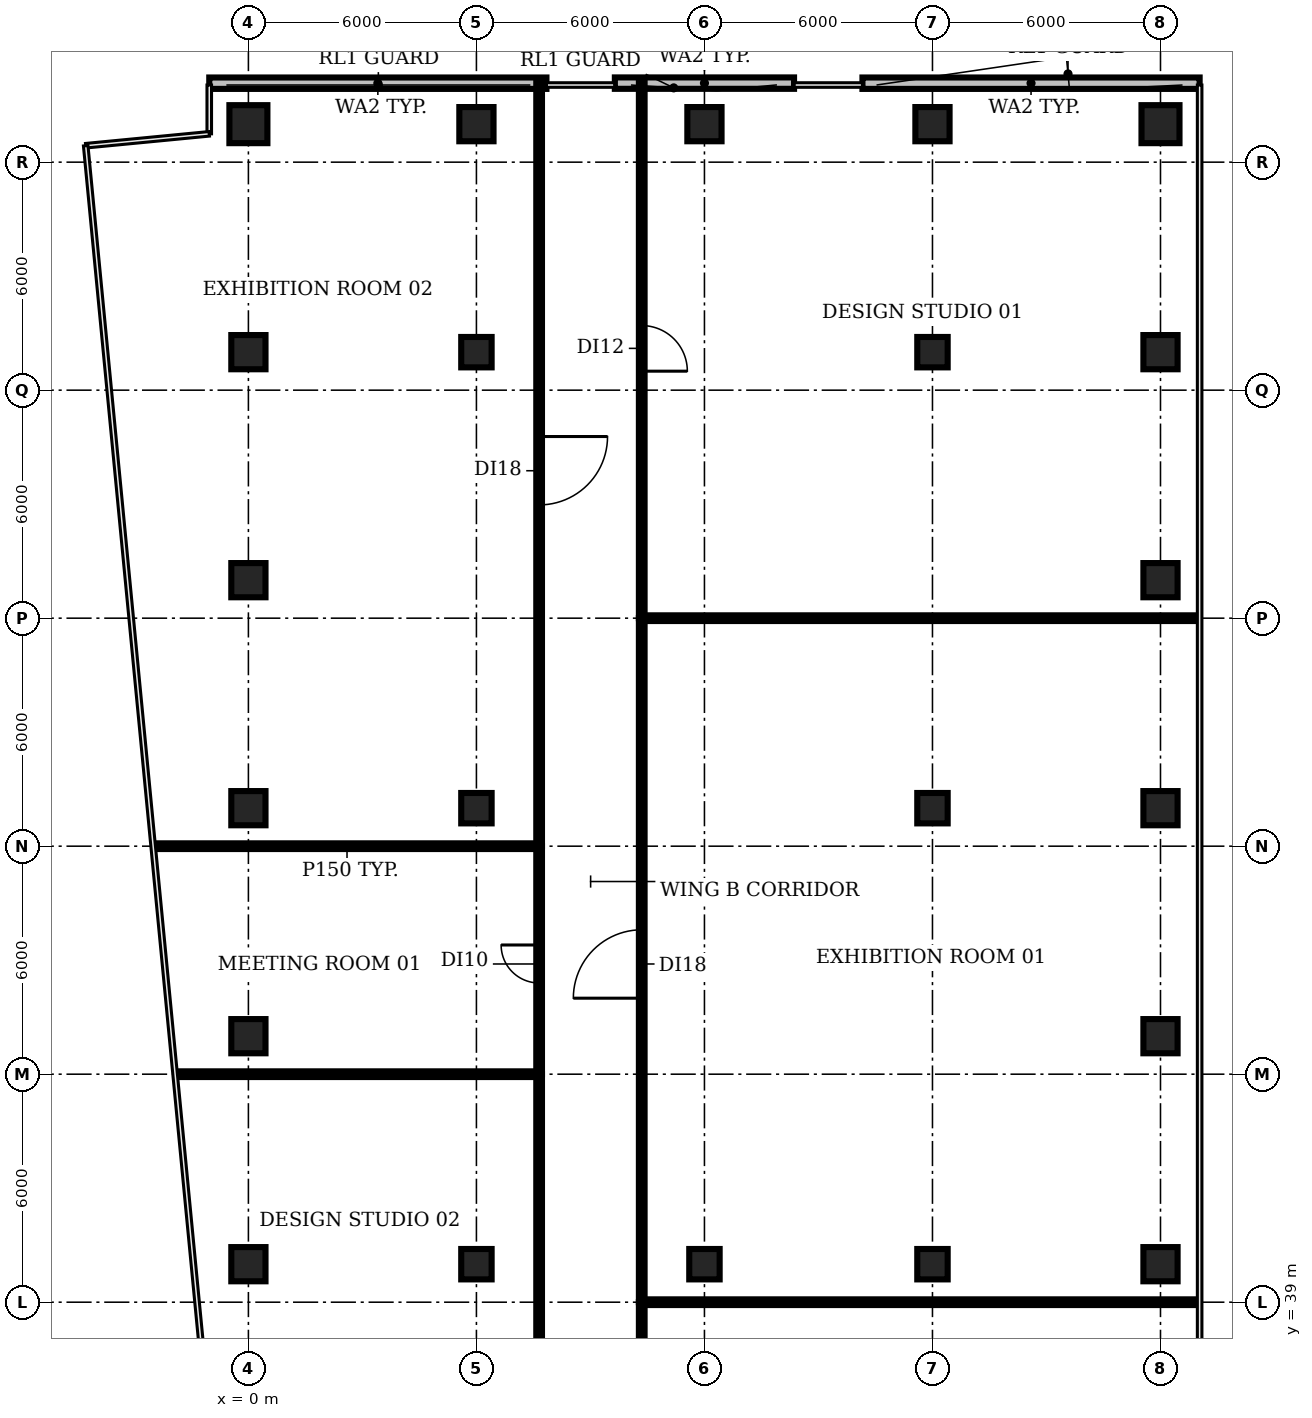
"""IFC4 building model, lengths in metres.
Left out: names, types, materials, properties, quantities, classifications, styles, units other than length and angle.
Written with IfcOpenShell. Run it as: python <this file> out.ifc"""

import sys

from ifc_helpers import new_model, si_unit, direction, frame, frame_2d, origin, origin_2d, place, context, subcontext, project, spatial, rectangle, circle, extrude, element, fill, save


model = new_model("IFC4")
c1 = context("Model", 3, precision=1e-05, world=origin(), true_north=direction((0.0, 1.0)))
c2 = subcontext(c1, "Body", "Model", "MODEL_VIEW")
j1 = project(units=[si_unit("LENGTHUNIT", "METRE"), si_unit("PLANEANGLEUNIT", "RADIAN")], contexts=[c1])
p1 = place(None, origin())
s1 = spatial("IfcSite", under=j1, at=p1, CompositionType="ELEMENT")
p2 = place(p1, origin())
s2 = spatial("IfcBuilding", under=s1, at=p2, CompositionType="ELEMENT")
p3 = place(p2, frame((0.0, 0.0, 205.4)))
s3 = spatial("IfcBuildingStorey", under=s2, at=p3, CompositionType="ELEMENT", Elevation=205.4)
for number, where, z_axis, x_axis in (
    (1, (0.0, 40.0, -0.35), (0.0, 0.0, 1.0), (1.0, 0.0, 0.0)),
    (2, (0.0, 46.0, -0.35), (0.0, 0.0, 1.0), (1.0, 0.0, 0.0)),
    (3, (0.0, 52.0, -0.35), (0.0, 0.0, 1.0), (1.0, 0.0, 0.0)),
    (4, (0.0, 58.0, -0.35), (0.0, 0.0, 1.0), (1.0, 0.0, 0.0)),
    (5, (0.0, 64.0, -0.35), (0.0, 0.0, 1.0), (1.0, 0.0, 0.0)),
):
    element("IfcColumn", number, at=place(p3, frame(where, z_axis=z_axis, x_axis=x_axis)), inside=s3, PredefinedType="COLUMN", context=c2, shape_type="SweptSolid", body=[
        extrude(rectangle(XDim=0.9, YDim=0.9, at=origin_2d()), origin(), (0.0, 0.0, 1.0), 4.2),
    ])
p4 = place(p3, frame((0.0, 70.0, -0.35), z_axis=(0.0, 0.0, 1.0), x_axis=(1.0, 0.0, 0.0)))
e6 = element("IfcColumn", 6, at=p4, inside=s3, PredefinedType="COLUMN", context=c2, shape_type="SweptSolid", body=[
    extrude(circle(Radius=0.5, at=origin_2d()), origin(), (0.0, 0.0, 1.0), 4.2),
])
for number, where, z_axis, x_axis in (
    (7, (6.0, 40.0, -0.35), (0.0, 0.0, 1.0), (1.0, 0.0, 0.0)),
    (8, (6.0, 52.0, -0.35), (0.0, 0.0, 1.0), (1.0, 0.0, 0.0)),
    (9, (6.0, 64.0, -0.35), (0.0, 0.0, 1.0), (1.0, 0.0, 0.0)),
):
    element("IfcColumn", number, at=place(p3, frame(where, z_axis=z_axis, x_axis=x_axis)), inside=s3, PredefinedType="COLUMN", context=c2, shape_type="SweptSolid", body=[
        extrude(rectangle(XDim=0.8, YDim=0.8, at=origin_2d()), origin(), (0.0, 0.0, 1.0), 4.2),
    ])
p5 = place(p3, frame((6.0, 70.0, -0.35), z_axis=(0.0, 0.0, 1.0), x_axis=(1.0, 0.0, 0.0)))
e10 = element("IfcColumn", 10, at=p5, inside=s3, PredefinedType="COLUMN", context=c2, shape_type="SweptSolid", body=[
    extrude(rectangle(XDim=0.9, YDim=0.9, at=origin_2d()), origin(), (0.0, 0.0, 1.0), 4.2),
])
p6 = place(p3, frame((12.0, 40.0, -0.35), z_axis=(0.0, 0.0, 1.0), x_axis=(1.0, 0.0, 0.0)))
e11 = element("IfcColumn", 11, at=p6, inside=s3, PredefinedType="COLUMN", context=c2, shape_type="SweptSolid", body=[
    extrude(rectangle(XDim=0.8, YDim=0.8, at=origin_2d()), origin(), (0.0, 0.0, 1.0), 4.2),
])
p7 = place(p3, frame((12.0, 70.0, -0.35), z_axis=(0.0, 0.0, 1.0), x_axis=(1.0, 0.0, 0.0)))
e12 = element("IfcColumn", 12, at=p7, inside=s3, PredefinedType="COLUMN", context=c2, shape_type="SweptSolid", body=[
    extrude(rectangle(XDim=0.9, YDim=0.9, at=origin_2d()), origin(), (0.0, 0.0, 1.0), 4.2),
])
for number, where, z_axis, x_axis in (
    (13, (18.0, 40.0, -0.35), (0.0, 0.0, 1.0), (1.0, 0.0, 0.0)),
    (14, (18.0, 52.0, -0.35), (0.0, 0.0, 1.0), (1.0, 0.0, 0.0)),
    (15, (18.0, 64.0, -0.35), (0.0, 0.0, 1.0), (1.0, 0.0, 0.0)),
):
    element("IfcColumn", number, at=place(p3, frame(where, z_axis=z_axis, x_axis=x_axis)), inside=s3, PredefinedType="COLUMN", context=c2, shape_type="SweptSolid", body=[
        extrude(rectangle(XDim=0.8, YDim=0.8, at=origin_2d()), origin(), (0.0, 0.0, 1.0), 4.2),
    ])
for number, where, z_axis, x_axis in (
    (16, (18.0, 70.0, -0.35), (0.0, 0.0, 1.0), (1.0, 0.0, 0.0)),
    (17, (24.0, 40.0, -0.35), (0.0, 0.0, 1.0), (1.0, 0.0, 0.0)),
    (18, (24.0, 46.0, -0.35), (0.0, 0.0, 1.0), (1.0, 0.0, 0.0)),
    (19, (24.0, 52.0, -0.35), (0.0, 0.0, 1.0), (1.0, 0.0, 0.0)),
    (20, (24.0, 58.0, -0.35), (0.0, 0.0, 1.0), (1.0, 0.0, 0.0)),
    (21, (24.0, 64.0, -0.35), (0.0, 0.0, 1.0), (1.0, 0.0, 0.0)),
):
    element("IfcColumn", number, at=place(p3, frame(where, z_axis=z_axis, x_axis=x_axis)), inside=s3, PredefinedType="COLUMN", context=c2, shape_type="SweptSolid", body=[
        extrude(rectangle(XDim=0.9, YDim=0.9, at=origin_2d()), origin(), (0.0, 0.0, 1.0), 4.2),
    ])
p8 = place(p3, frame((24.0, 70.0, -0.35), z_axis=(0.0, 0.0, 1.0), x_axis=(1.0, 0.0, 0.0)))
e22 = element("IfcColumn", 22, at=p8, inside=s3, PredefinedType="COLUMN", context=c2, shape_type="SweptSolid", body=[
    extrude(circle(Radius=0.5, at=origin_2d()), origin(), (0.0, 0.0, 1.0), 4.2),
])
p9 = place(p3, frame((25.03, 71.078, 0.0), z_axis=(0.0, 0.0, 1.0), x_axis=(-1.0, 0.0, 0.0)))
e23 = element("IfcWall", 23, at=p9, inside=s3, PredefinedType="SOLIDWALL", context=c2, shape_type="SweptSolid", body=[
    extrude(rectangle(XDim=8.873, YDim=0.3, at=frame_2d((4.436, 0.0))), origin(), (0.0, 0.0, 1.0), 3.85),
])
p10 = place(p3, frame((14.357, 71.08, 0.0), z_axis=(0.0, 0.0, 1.0), x_axis=(-1.0, 0.0, 0.0)))
e24 = element("IfcWall", 24, at=p10, inside=s3, PredefinedType="SOLIDWALL", context=c2, shape_type="SweptSolid", body=[
    extrude(rectangle(XDim=4.715, YDim=0.3, at=frame_2d((2.357, 0.0))), origin(), (0.0, 0.0, 1.0), 3.85),
])
p11 = place(p3, frame((7.843, 71.078, 0.0), z_axis=(0.0, 0.0, 1.0), x_axis=(-1.0, 0.0, 0.0)))
e25 = element("IfcWall", 25, at=p11, inside=s3, PredefinedType="SOLIDWALL", context=c2, shape_type="SweptSolid", body=[
    extrude(rectangle(XDim=8.873, YDim=0.3, at=frame_2d((4.436, 0.0))), origin(), (0.0, 0.0, 1.0), 3.85),
])
p12 = place(p3, frame((-2.46, 51.0, 0.0), z_axis=(0.0, 0.0, 1.0), x_axis=(1.0, 0.0, 0.0)))
e26 = element("IfcWall", 26, at=p12, inside=s3, PredefinedType="PARTITIONING", context=c2, shape_type="SweptSolid", body=[
    extrude(rectangle(XDim=10.11, YDim=0.15, at=frame_2d((5.055, 0.0))), origin(), (0.0, 0.0, 1.0), 2.88),
])
p13 = place(p3, frame((-1.88, 45.0, 0.0), z_axis=(0.0, 0.0, 1.0), x_axis=(1.0, 0.0, 0.0)))
e27 = element("IfcWall", 27, at=p13, inside=s3, PredefinedType="PARTITIONING", context=c2, shape_type="SweptSolid", body=[
    extrude(rectangle(XDim=9.53, YDim=0.15, at=frame_2d((4.765, 0.0))), origin(), (0.0, 0.0, 1.0), 2.88),
])
p14 = place(p3, frame((7.65, 33.95, 0.0), z_axis=(0.0, 0.0, 1.0), x_axis=(0.0, 1.0, 0.0)))
e28 = element("IfcWall", 28, at=p14, inside=s3, PredefinedType="PARTITIONING", context=c2, shape_type="SweptSolid", body=[
    extrude(rectangle(XDim=11.05, YDim=0.15, at=frame_2d((5.525, 0.0))), origin(), (0.0, 0.0, 1.0), 2.88),
])
p15 = place(p14, frame((2.75, 0.0, 0.0)))
e29 = element("IfcOpeningElement", 29, at=p15, cuts=e28, PredefinedType="OPENING", context=c2, shape_type="SweptSolid", body=[
    extrude(rectangle(XDim=1.2, YDim=2.1, at=frame_2d((0.6, 1.05))), frame((0.0, 0.085, 0.0), z_axis=(0.0, -1.0, 0.0), x_axis=(1.0, 0.0, 0.0)), (0.0, 0.0, 1.0), 0.17),
])
p16 = place(p3, frame((7.65, 45.0, 0.0), z_axis=(0.0, 0.0, 1.0), x_axis=(0.0, 1.0, 0.0)))
e30 = element("IfcWall", 30, at=p16, inside=s3, PredefinedType="PARTITIONING", context=c2, shape_type="SweptSolid", body=[
    extrude(rectangle(XDim=6.0, YDim=0.15, at=frame_2d((3.0, 0.0))), origin(), (0.0, 0.0, 1.0), 2.88),
])
p17 = place(p16, frame((2.4, 0.0, 0.0)))
e31 = element("IfcOpeningElement", 31, at=p17, cuts=e30, PredefinedType="OPENING", context=c2, shape_type="SweptSolid", body=[
    extrude(rectangle(XDim=1.0, YDim=2.1, at=frame_2d((0.5, 1.05))), frame((0.0, 0.085, 0.0), z_axis=(0.0, -1.0, 0.0), x_axis=(1.0, 0.0, 0.0)), (0.0, 0.0, 1.0), 0.17),
])
p18 = place(p3, frame((7.65, 71.09, 0.0), z_axis=(0.0, 0.0, 1.0), x_axis=(0.0, -1.0, 0.0)))
e32 = element("IfcWall", 32, at=p18, inside=s3, PredefinedType="PARTITIONING", context=c2, shape_type="SweptSolid", body=[
    extrude(rectangle(XDim=20.09, YDim=0.15, at=frame_2d((10.045, 0.0))), origin(), (0.0, 0.0, 1.0), 2.88),
])
p19 = place(p18, frame((9.31, 0.0, 0.0)))
e33 = element("IfcOpeningElement", 33, at=p19, cuts=e32, PredefinedType="OPENING", context=c2, shape_type="SweptSolid", body=[
    extrude(rectangle(XDim=1.8, YDim=2.1, at=frame_2d((0.9, 1.05))), frame((0.0, 0.085, 0.0), z_axis=(0.0, -1.0, 0.0), x_axis=(1.0, 0.0, 0.0)), (0.0, 0.0, 1.0), 0.17),
])
p20 = place(p3, frame((10.35, 39.0, 0.0), z_axis=(0.0, 0.0, 1.0), x_axis=(0.0, -1.0, 0.0)))
e34 = element("IfcWall", 34, at=p20, inside=s3, PredefinedType="PARTITIONING", context=c2, shape_type="SweptSolid", body=[
    extrude(rectangle(XDim=5.05, YDim=0.15, at=frame_2d((2.525, 0.0))), origin(), (0.0, 0.0, 1.0), 2.88),
])
p21 = place(p20, frame((1.85, 0.0, 0.0)))
e35 = element("IfcOpeningElement", 35, at=p21, cuts=e34, PredefinedType="OPENING", context=c2, shape_type="SweptSolid", body=[
    extrude(rectangle(XDim=1.2, YDim=2.1, at=frame_2d((0.6, 1.05))), frame((0.0, 0.085, 0.0), z_axis=(0.0, -1.0, 0.0), x_axis=(1.0, 0.0, 0.0)), (0.0, 0.0, 1.0), 0.17),
])
p22 = place(p3, frame((10.35, 39.0, 0.0), z_axis=(0.0, 0.0, 1.0), x_axis=(0.0, 1.0, 0.0)))
e36 = element("IfcWall", 36, at=p22, inside=s3, PredefinedType="PARTITIONING", context=c2, shape_type="SweptSolid", body=[
    extrude(rectangle(XDim=18.0, YDim=0.15, at=frame_2d((9.0, 0.0))), origin(), (0.0, 0.0, 1.0), 2.88),
])
p23 = place(p22, frame((8.0, 0.0, 0.0)))
e37 = element("IfcOpeningElement", 37, at=p23, cuts=e36, PredefinedType="OPENING", context=c2, shape_type="SweptSolid", body=[
    extrude(rectangle(XDim=1.8, YDim=2.1, at=frame_2d((0.9, 1.05))), frame((0.0, 0.085, 0.0), z_axis=(0.0, -1.0, 0.0), x_axis=(1.0, 0.0, 0.0)), (0.0, 0.0, 1.0), 0.17),
])
for number, where, z_axis, x_axis in (
    (38, (10.35, 39.0, 0.0), (0.0, 0.0, 1.0), (1.0, 0.0, 0.0)),
    (39, (10.35, 57.0, 0.0), (0.0, 0.0, 1.0), (1.0, 0.0, 0.0)),
):
    element("IfcWall", number, at=place(p3, frame(where, z_axis=z_axis, x_axis=x_axis)), inside=s3, PredefinedType="PARTITIONING", context=c2, shape_type="SweptSolid", body=[
        extrude(rectangle(XDim=14.63, YDim=0.15, at=frame_2d((7.315, 0.0))), origin(), (0.0, 0.0, 1.0), 2.88),
    ])
p24 = place(p3, frame((10.35, 71.09, 0.0), z_axis=(0.0, 0.0, 1.0), x_axis=(0.0, -1.0, 0.0)))
e40 = element("IfcWall", 40, at=p24, inside=s3, PredefinedType="PARTITIONING", context=c2, shape_type="SweptSolid", body=[
    extrude(rectangle(XDim=14.09, YDim=0.15, at=frame_2d((7.045, 0.0))), origin(), (0.0, 0.0, 1.0), 2.88),
])
p25 = place(p24, frame((6.39, 0.0, 0.0)))
e41 = element("IfcOpeningElement", 41, at=p25, cuts=e40, PredefinedType="OPENING", context=c2, shape_type="SweptSolid", body=[
    extrude(rectangle(XDim=1.2, YDim=2.1, at=frame_2d((0.6, 1.05))), frame((0.0, 0.085, 0.0), z_axis=(0.0, -1.0, 0.0), x_axis=(1.0, 0.0, 0.0)), (0.0, 0.0, 1.0), 0.17),
])
p26 = place(p17, origin())
e42 = element("IfcDoor", 42, at=p26, inside=s3, OperationType="SINGLE_SWING_RIGHT", PredefinedType="DOOR", context=c2, shape_type="SweptSolid", body=[
    extrude(rectangle(XDim=1.0, YDim=2.1, at=frame_2d((0.5, 1.05))), frame((0.0, 0.025, 0.0), z_axis=(0.0, -1.0, 0.0), x_axis=(1.0, 0.0, 0.0)), (0.0, 0.0, 1.0), 0.05),
])
fill(e31, e42)
p27 = place(p19, origin())
e43 = element("IfcDoor", 43, at=p27, inside=s3, OperationType="SINGLE_SWING_LEFT", PredefinedType="DOOR", context=c2, shape_type="SweptSolid", body=[
    extrude(rectangle(XDim=1.8, YDim=2.1, at=frame_2d((0.9, 1.05))), frame((0.0, 0.025, 0.0), z_axis=(0.0, -1.0, 0.0), x_axis=(1.0, 0.0, 0.0)), (0.0, 0.0, 1.0), 0.05),
])
fill(e33, e43)
p28 = place(p23, origin())
e44 = element("IfcDoor", 44, at=p28, inside=s3, OperationType="SINGLE_SWING_LEFT", PredefinedType="DOOR", context=c2, shape_type="SweptSolid", body=[
    extrude(rectangle(XDim=1.8, YDim=2.1, at=frame_2d((0.9, 1.05))), frame((0.0, 0.025, 0.0), z_axis=(0.0, -1.0, 0.0), x_axis=(1.0, 0.0, 0.0)), (0.0, 0.0, 1.0), 0.05),
])
fill(e37, e44)
p29 = place(p25, origin())
e45 = element("IfcDoor", 45, at=p29, inside=s3, OperationType="SINGLE_SWING_RIGHT", PredefinedType="DOOR", context=c2, shape_type="SweptSolid", body=[
    extrude(rectangle(XDim=1.2, YDim=2.1, at=frame_2d((0.6, 1.05))), frame((0.0, 0.025, 0.0), z_axis=(0.0, -1.0, 0.0), x_axis=(1.0, 0.0, 0.0)), (0.0, 0.0, 1.0), 0.05),
])
fill(e41, e45)
save(model, sys.argv[1])
